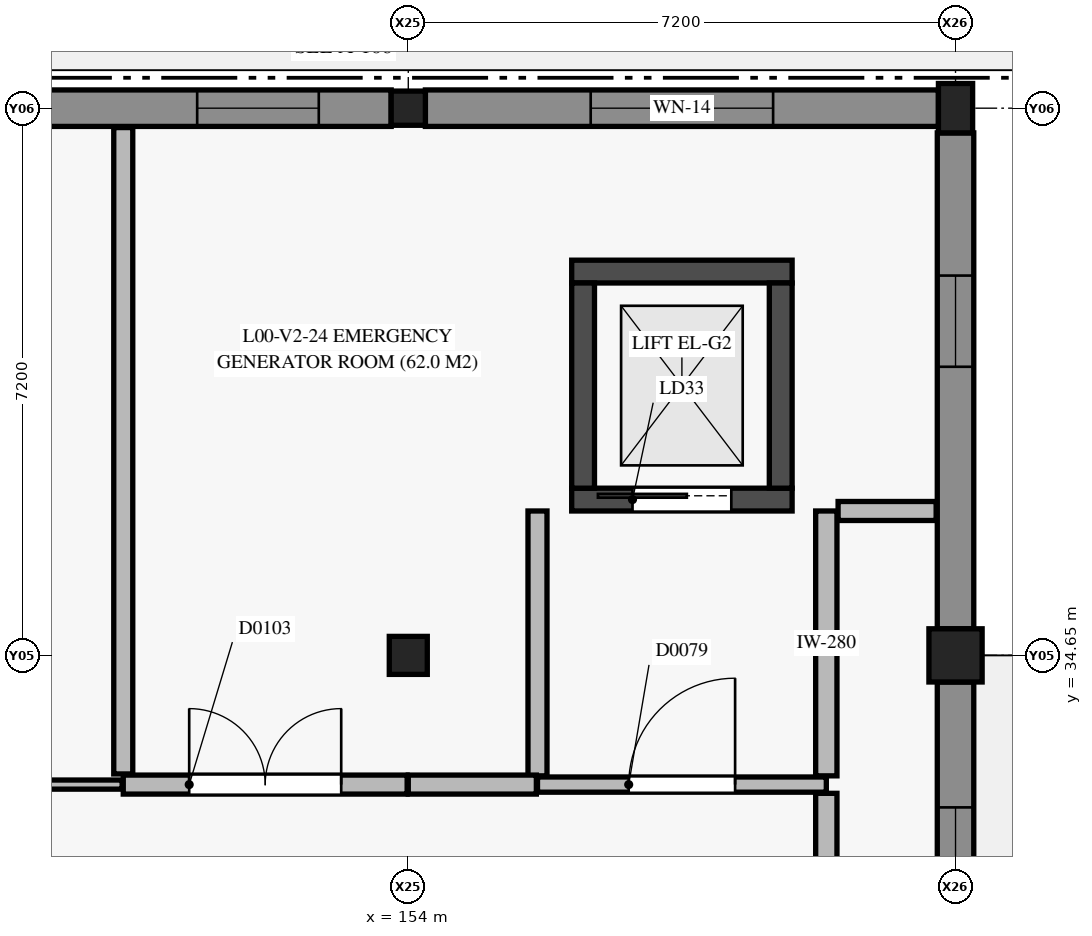
"""IFC4 building model, lengths in metres.
Left out: names, types, materials, properties, quantities, classifications, styles, units other than length and angle.
Written with IfcOpenShell. Run it as: python <this file> out.ifc"""

import sys

from ifc_helpers import new_model, si_unit, direction, frame, frame_2d, origin, origin_2d, place, context, subcontext, project, spatial, rectangle, circle, extrude, element, fill, save


model = new_model("IFC4")
c1 = context("Model", 3, precision=1e-05, world=origin(), true_north=direction((0.0, 1.0)))
c2 = subcontext(c1, "Body", "Model", "MODEL_VIEW")
j1 = project(units=[si_unit("LENGTHUNIT", "METRE"), si_unit("PLANEANGLEUNIT", "RADIAN")], contexts=[c1])
p1 = place(None, origin())
s1 = spatial("IfcSite", under=j1, at=p1, CompositionType="ELEMENT")
p2 = place(p1, origin())
s2 = spatial("IfcBuilding", under=s1, at=p2, CompositionType="ELEMENT")
p3 = place(p2, origin())
s3 = spatial("IfcBuildingStorey", under=s2, at=p3, CompositionType="ELEMENT", Elevation=0.0)
p4 = place(p3, frame((154.0, 34.65, 0.0), z_axis=(0.0, 0.0, 1.0), x_axis=(1.0, 0.0, 0.0)))
e1 = element("IfcColumn", 1, at=p4, inside=s3, PredefinedType="COLUMN", context=c2, shape_type="SweptSolid", body=[
    extrude(rectangle(XDim=0.5, YDim=0.5, at=origin_2d()), origin(), (0.0, 0.0, 1.0), 4.8),
])
p5 = place(p3, frame((154.0, 41.85, 0.0), z_axis=(0.0, 0.0, 1.0), x_axis=(1.0, 0.0, 0.0)))
e2 = element("IfcColumn", 2, at=p5, inside=s3, PredefinedType="COLUMN", context=c2, shape_type="SweptSolid", body=[
    extrude(rectangle(XDim=0.45, YDim=0.45, at=origin_2d()), origin(), (0.0, 0.0, 1.0), 4.8),
])
p6 = place(p3, frame((161.2, 34.65, 0.0), z_axis=(0.0, 0.0, 1.0), x_axis=(1.0, 0.0, 0.0)))
e3 = element("IfcColumn", 3, at=p6, inside=s3, PredefinedType="COLUMN", context=c2, shape_type="SweptSolid", body=[
    extrude(circle(Radius=0.35, at=origin_2d()), origin(), (0.0, 0.0, 1.0), 4.8),
])
p7 = place(p3, frame((161.2, 41.85, 0.0), z_axis=(0.0, 0.0, 1.0), x_axis=(1.0, 0.0, 0.0)))
e4 = element("IfcColumn", 4, at=p7, inside=s3, PredefinedType="COLUMN", context=c2, shape_type="SweptSolid", body=[
    extrude(rectangle(XDim=0.45, YDim=0.65, at=origin_2d()), origin(), (0.0, 0.0, 1.0), 4.8),
])
p8 = place(p3, frame((156.15, 36.7, 0.0), z_axis=(0.0, 0.0, 1.0), x_axis=(1.0, 0.0, 0.0)))
e5 = element("IfcWall", 5, at=p8, inside=s3, PredefinedType="SHEAR", context=c2, shape_type="SweptSolid", body=[
    extrude(rectangle(XDim=2.9, YDim=0.3, at=frame_2d((1.45, 0.0))), origin(), (0.0, 0.0, 1.0), 4.46),
])
p9 = place(p8, frame((0.8, 0.0, 0.0)))
e6 = element("IfcOpeningElement", 6, at=p9, cuts=e5, PredefinedType="OPENING", context=c2, shape_type="SweptSolid", body=[
    extrude(rectangle(XDim=1.3, YDim=2.15, at=frame_2d((0.65, 1.075))), frame((0.0, 0.16, 0.0), z_axis=(0.0, -1.0, 0.0), x_axis=(1.0, 0.0, 0.0)), (0.0, 0.0, 1.0), 0.32),
])
p10 = place(p3, frame((156.15, 39.7, 0.0), z_axis=(0.0, 0.0, 1.0), x_axis=(1.0, 0.0, 0.0)))
e7 = element("IfcWall", 7, at=p10, inside=s3, PredefinedType="SHEAR", context=c2, shape_type="SweptSolid", body=[
    extrude(rectangle(XDim=2.9, YDim=0.3, at=frame_2d((1.45, 0.0))), origin(), (0.0, 0.0, 1.0), 4.46),
])
for number, where, z_axis, x_axis in (
    (8, (156.3, 36.85, 0.0), (0.0, 0.0, 1.0), (0.0, 1.0, 0.0)),
    (9, (158.9, 36.85, 0.0), (0.0, 0.0, 1.0), (0.0, 1.0, 0.0)),
):
    element("IfcWall", number, at=place(p3, frame(where, z_axis=z_axis, x_axis=x_axis)), inside=s3, PredefinedType="SHEAR", context=c2, shape_type="SweptSolid", body=[
        extrude(rectangle(XDim=2.7, YDim=0.3, at=frame_2d((1.35, 0.0))), origin(), (0.0, 0.0, 1.0), 4.46),
    ])
p11 = place(p3, frame((147.15, 41.85, 0.0), z_axis=(0.0, 0.0, 1.0), x_axis=(1.0, 0.0, 0.0)))
e10 = element("IfcWall", 10, at=p11, inside=s3, PredefinedType="SOLIDWALL", context=c2, shape_type="SweptSolid", body=[
    extrude(rectangle(XDim=6.625, YDim=0.48, at=frame_2d((3.312, 0.0))), origin(), (0.0, 0.0, 1.0), 3.64),
])
p12 = place(p11, frame((0.94, 0.0, 0.6)))
e11 = element("IfcOpeningElement", 11, at=p12, cuts=e10, PredefinedType="OPENING", context=c2, shape_type="SweptSolid", body=[
    extrude(rectangle(XDim=1.2, YDim=2.2, at=frame_2d((0.6, 1.1))), frame((0.0, 0.25, 0.0), z_axis=(0.0, -1.0, 0.0), x_axis=(1.0, 0.0, 0.0)), (0.0, 0.0, 1.0), 0.5),
])
p13 = place(p11, frame((4.073, 0.0, 0.6)))
e12 = element("IfcOpeningElement", 12, at=p13, cuts=e10, PredefinedType="OPENING", context=c2, shape_type="SweptSolid", body=[
    extrude(rectangle(XDim=1.6, YDim=2.2, at=frame_2d((0.8, 1.1))), frame((0.0, 0.25, 0.0), z_axis=(0.0, -1.0, 0.0), x_axis=(1.0, 0.0, 0.0)), (0.0, 0.0, 1.0), 0.5),
])
p14 = place(p3, frame((154.225, 41.85, 0.0), z_axis=(0.0, 0.0, 1.0), x_axis=(1.0, 0.0, 0.0)))
e13 = element("IfcWall", 13, at=p14, inside=s3, PredefinedType="SOLIDWALL", context=c2, shape_type="SweptSolid", body=[
    extrude(rectangle(XDim=6.75, YDim=0.48, at=frame_2d((3.375, 0.0))), origin(), (0.0, 0.0, 1.0), 3.64),
])
p15 = place(p14, frame((2.175, 0.0, 0.9)))
e14 = element("IfcOpeningElement", 14, at=p15, cuts=e13, PredefinedType="OPENING", context=c2, shape_type="SweptSolid", body=[
    extrude(rectangle(XDim=2.4, YDim=1.5, at=frame_2d((1.2, 0.75))), frame((0.0, 0.25, 0.0), z_axis=(0.0, -1.0, 0.0), x_axis=(1.0, 0.0, 0.0)), (0.0, 0.0, 1.0), 0.5),
])
p16 = place(p3, frame((161.2, 41.525, 0.0), z_axis=(0.0, 0.0, 1.0), x_axis=(0.0, -1.0, 0.0)))
e15 = element("IfcWall", 15, at=p16, inside=s3, PredefinedType="SOLIDWALL", context=c2, shape_type="SweptSolid", body=[
    extrude(rectangle(XDim=6.525, YDim=0.48, at=frame_2d((3.262, 0.0))), origin(), (0.0, 0.0, 1.0), 3.64),
])
p17 = place(p16, frame((1.877, 0.0, 0.6)))
e16 = element("IfcOpeningElement", 16, at=p17, cuts=e15, PredefinedType="OPENING", context=c2, shape_type="SweptSolid", body=[
    extrude(rectangle(XDim=1.2, YDim=2.2, at=frame_2d((0.6, 1.1))), frame((0.0, 0.25, 0.0), z_axis=(0.0, -1.0, 0.0), x_axis=(1.0, 0.0, 0.0)), (0.0, 0.0, 1.0), 0.5),
])
p18 = place(p3, frame((161.2, 34.3, 0.0), z_axis=(0.0, 0.0, 1.0), x_axis=(0.0, -1.0, 0.0)))
e17 = element("IfcWall", 17, at=p18, inside=s3, PredefinedType="SOLIDWALL", context=c2, shape_type="SweptSolid", body=[
    extrude(rectangle(XDim=6.65, YDim=0.48, at=frame_2d((3.325, 0.0))), origin(), (0.0, 0.0, 1.0), 3.64),
])
p19 = place(p18, frame((1.65, 0.0, 0.6)))
e18 = element("IfcOpeningElement", 18, at=p19, cuts=e17, PredefinedType="OPENING", context=c2, shape_type="SweptSolid", body=[
    extrude(rectangle(XDim=0.8, YDim=2.6, at=frame_2d((0.4, 1.3))), frame((0.0, 0.25, 0.0), z_axis=(0.0, -1.0, 0.0), x_axis=(1.0, 0.0, 0.0)), (0.0, 0.0, 1.0), 0.5),
])
p20 = place(p18, frame((5.095, 0.0, 0.9)))
e19 = element("IfcOpeningElement", 19, at=p20, cuts=e17, PredefinedType="OPENING", context=c2, shape_type="SweptSolid", body=[
    extrude(rectangle(XDim=0.6, YDim=1.8, at=frame_2d((0.3, 0.9))), frame((0.0, 0.25, 0.0), z_axis=(0.0, -1.0, 0.0), x_axis=(1.0, 0.0, 0.0)), (0.0, 0.0, 1.0), 0.5),
])
p21 = place(p3, frame((155.7, 32.95, 0.0), z_axis=(0.0, 0.0, 1.0), x_axis=(1.0, 0.0, 0.0)))
e20 = element("IfcWall", 20, at=p21, inside=s3, PredefinedType="PARTITIONING", context=c2, shape_type="SweptSolid", body=[
    extrude(rectangle(XDim=3.8, YDim=0.2, at=frame_2d((1.9, 0.0))), origin(), (0.0, 0.0, 1.0), 4.46),
])
p22 = place(p21, frame((1.2, 0.0, 0.0)))
e21 = element("IfcOpeningElement", 21, at=p22, cuts=e20, PredefinedType="OPENING", context=c2, shape_type="SweptSolid", body=[
    extrude(rectangle(XDim=1.4, YDim=2.2, at=frame_2d((0.7, 1.1))), frame((0.0, 0.11, 0.0), z_axis=(0.0, -1.0, 0.0), x_axis=(1.0, 0.0, 0.0)), (0.0, 0.0, 1.0), 0.22),
])
p23 = place(p3, frame((155.7, 33.065, 0.0), z_axis=(0.0, 0.0, 1.0), x_axis=(0.0, 1.0, 0.0)))
e22 = element("IfcWall", 22, at=p23, inside=s3, PredefinedType="PARTITIONING", context=c2, shape_type="SweptSolid", body=[
    extrude(rectangle(XDim=3.485, YDim=0.25, at=frame_2d((1.743, 0.0))), origin(), (0.0, 0.0, 1.0), 3.965),
])
p24 = place(p3, frame((159.5, 33.065, 0.0), z_axis=(0.0, 0.0, 1.0), x_axis=(0.0, 1.0, 0.0)))
e23 = element("IfcWall", 23, at=p24, inside=s3, PredefinedType="PARTITIONING", context=c2, shape_type="SweptSolid", body=[
    extrude(rectangle(XDim=3.485, YDim=0.28, at=frame_2d((1.743, 0.0))), origin(), (0.0, 0.0, 1.0), 3.965),
])
p25 = place(p3, frame((154.0, 32.95, 0.0), z_axis=(0.0, 0.0, 1.0), x_axis=(1.0, 0.0, 0.0)))
e24 = element("IfcWall", 24, at=p25, inside=s3, PredefinedType="PARTITIONING", context=c2, shape_type="SweptSolid", body=[
    extrude(rectangle(XDim=1.685, YDim=0.25, at=frame_2d((0.843, 0.0))), origin(), (0.0, 0.0, 1.0), 3.795),
])
p26 = place(p3, frame((150.25, 32.95, 0.0), z_axis=(0.0, 0.0, 1.0), x_axis=(1.0, 0.0, 0.0)))
e25 = element("IfcWall", 25, at=p26, inside=s3, PredefinedType="PARTITIONING", context=c2, shape_type="SweptSolid", body=[
    extrude(rectangle(XDim=3.735, YDim=0.25, at=frame_2d((1.868, 0.0))), origin(), (0.0, 0.0, 1.0), 3.795),
])
p27 = place(p26, frame((0.867, 0.0, 0.0)))
e26 = element("IfcOpeningElement", 26, at=p27, cuts=e25, PredefinedType="OPENING", context=c2, shape_type="SweptSolid", body=[
    extrude(rectangle(XDim=2.0, YDim=2.4, at=frame_2d((1.0, 1.2))), frame((0.0, 0.135, 0.0), z_axis=(0.0, -1.0, 0.0), x_axis=(1.0, 0.0, 0.0)), (0.0, 0.0, 1.0), 0.27),
])
p28 = place(p3, frame((159.5, 30.705, 0.0), z_axis=(0.0, 0.0, 1.0), x_axis=(0.0, 1.0, 0.0)))
e27 = element("IfcWall", 27, at=p28, inside=s3, PredefinedType="PARTITIONING", context=c2, shape_type="SweptSolid", body=[
    extrude(rectangle(XDim=2.13, YDim=0.28, at=frame_2d((1.065, 0.0))), origin(), (0.0, 0.0, 1.0), 3.985),
])
p29 = place(p3, frame((146.815, 32.95, 0.0), z_axis=(0.0, 0.0, 1.0), x_axis=(1.0, 0.0, 0.0)))
e28 = element("IfcWall", 28, at=p29, inside=s3, PredefinedType="PARTITIONING", context=c2, shape_type="SweptSolid", body=[
    extrude(rectangle(XDim=3.42, YDim=0.12, at=frame_2d((1.71, 0.0))), origin(), (0.0, 0.0, 1.0), 3.965),
])
p30 = place(p29, frame((1.235, 0.0, 0.0)))
e29 = element("IfcOpeningElement", 29, at=p30, cuts=e28, PredefinedType="OPENING", context=c2, shape_type="SweptSolid", body=[
    extrude(rectangle(XDim=0.95, YDim=2.1, at=frame_2d((0.475, 1.05))), frame((0.0, 0.07, 0.0), z_axis=(0.0, -1.0, 0.0), x_axis=(1.0, 0.0, 0.0)), (0.0, 0.0, 1.0), 0.14),
])
p31 = place(p3, frame((159.655, 36.55, 0.0), z_axis=(0.0, 0.0, 1.0), x_axis=(1.0, 0.0, 0.0)))
e30 = element("IfcWall", 30, at=p31, inside=s3, PredefinedType="PARTITIONING", context=c2, shape_type="SweptSolid", body=[
    extrude(rectangle(XDim=1.29, YDim=0.25, at=frame_2d((0.645, 0.0))), origin(), (0.0, 0.0, 1.0), 4.46),
])
p32 = place(p3, frame((150.25, 33.09, 0.0), z_axis=(0.0, 0.0, 1.0), x_axis=(0.0, 1.0, 0.0)))
e31 = element("IfcWall", 31, at=p32, inside=s3, PredefinedType="PARTITIONING", context=c2, shape_type="SweptSolid", body=[
    extrude(rectangle(XDim=8.505, YDim=0.25, at=frame_2d((4.252, 0.0))), origin(), (0.0, 0.0, 1.0), 3.925),
])
p33 = place(p13, origin())
e32 = element("IfcWindow", 32, at=p33, inside=s3, PartitioningType="SINGLE_PANEL", PredefinedType="WINDOW", context=c2, shape_type="SweptSolid", body=[
    extrude(rectangle(XDim=1.6, YDim=2.2, at=frame_2d((0.8, 1.1))), frame((0.0, 0.03, 0.0), z_axis=(0.0, -1.0, 0.0), x_axis=(1.0, 0.0, 0.0)), (0.0, 0.0, 1.0), 0.06),
])
fill(e12, e32)
p34 = place(p15, origin())
e33 = element("IfcWindow", 33, at=p34, inside=s3, PartitioningType="SINGLE_PANEL", PredefinedType="WINDOW", context=c2, shape_type="SweptSolid", body=[
    extrude(rectangle(XDim=2.4, YDim=1.5, at=frame_2d((1.2, 0.75))), frame((0.0, 0.03, 0.0), z_axis=(0.0, -1.0, 0.0), x_axis=(1.0, 0.0, 0.0)), (0.0, 0.0, 1.0), 0.06),
])
fill(e14, e33)
p35 = place(p17, origin())
e34 = element("IfcWindow", 34, at=p35, inside=s3, PartitioningType="SINGLE_PANEL", PredefinedType="WINDOW", context=c2, shape_type="SweptSolid", body=[
    extrude(rectangle(XDim=1.2, YDim=2.2, at=frame_2d((0.6, 1.1))), frame((0.0, 0.03, 0.0), z_axis=(0.0, -1.0, 0.0), x_axis=(1.0, 0.0, 0.0)), (0.0, 0.0, 1.0), 0.06),
])
fill(e16, e34)
p36 = place(p19, origin())
e35 = element("IfcWindow", 35, at=p36, inside=s3, PartitioningType="SINGLE_PANEL", PredefinedType="WINDOW", context=c2, shape_type="SweptSolid", body=[
    extrude(rectangle(XDim=0.8, YDim=2.6, at=frame_2d((0.4, 1.3))), frame((0.0, 0.03, 0.0), z_axis=(0.0, -1.0, 0.0), x_axis=(1.0, 0.0, 0.0)), (0.0, 0.0, 1.0), 0.06),
])
fill(e18, e35)
p37 = place(p9, origin())
e36 = element("IfcDoor", 36, at=p37, inside=s3, OperationType="SLIDING_TO_LEFT", PredefinedType="DOOR", context=c2, shape_type="SweptSolid", body=[
    extrude(rectangle(XDim=1.3, YDim=2.15, at=frame_2d((0.65, 1.075))), frame((0.0, 0.025, 0.0), z_axis=(0.0, -1.0, 0.0), x_axis=(1.0, 0.0, 0.0)), (0.0, 0.0, 1.0), 0.05),
])
fill(e6, e36)
p38 = place(p22, origin())
e37 = element("IfcDoor", 37, at=p38, inside=s3, OperationType="SINGLE_SWING_RIGHT", PredefinedType="DOOR", context=c2, shape_type="SweptSolid", body=[
    extrude(rectangle(XDim=1.4, YDim=2.2, at=frame_2d((0.7, 1.1))), frame((0.0, 0.025, 0.0), z_axis=(0.0, -1.0, 0.0), x_axis=(1.0, 0.0, 0.0)), (0.0, 0.0, 1.0), 0.05),
])
fill(e21, e37)
p39 = place(p27, origin())
e38 = element("IfcDoor", 38, at=p39, inside=s3, OperationType="DOUBLE_DOOR_SINGLE_SWING", PredefinedType="DOOR", context=c2, shape_type="SweptSolid", body=[
    extrude(rectangle(XDim=2.0, YDim=2.4, at=frame_2d((1.0, 1.2))), frame((0.0, 0.025, 0.0), z_axis=(0.0, -1.0, 0.0), x_axis=(1.0, 0.0, 0.0)), (0.0, 0.0, 1.0), 0.05),
])
fill(e26, e38)
save(model, sys.argv[1])
